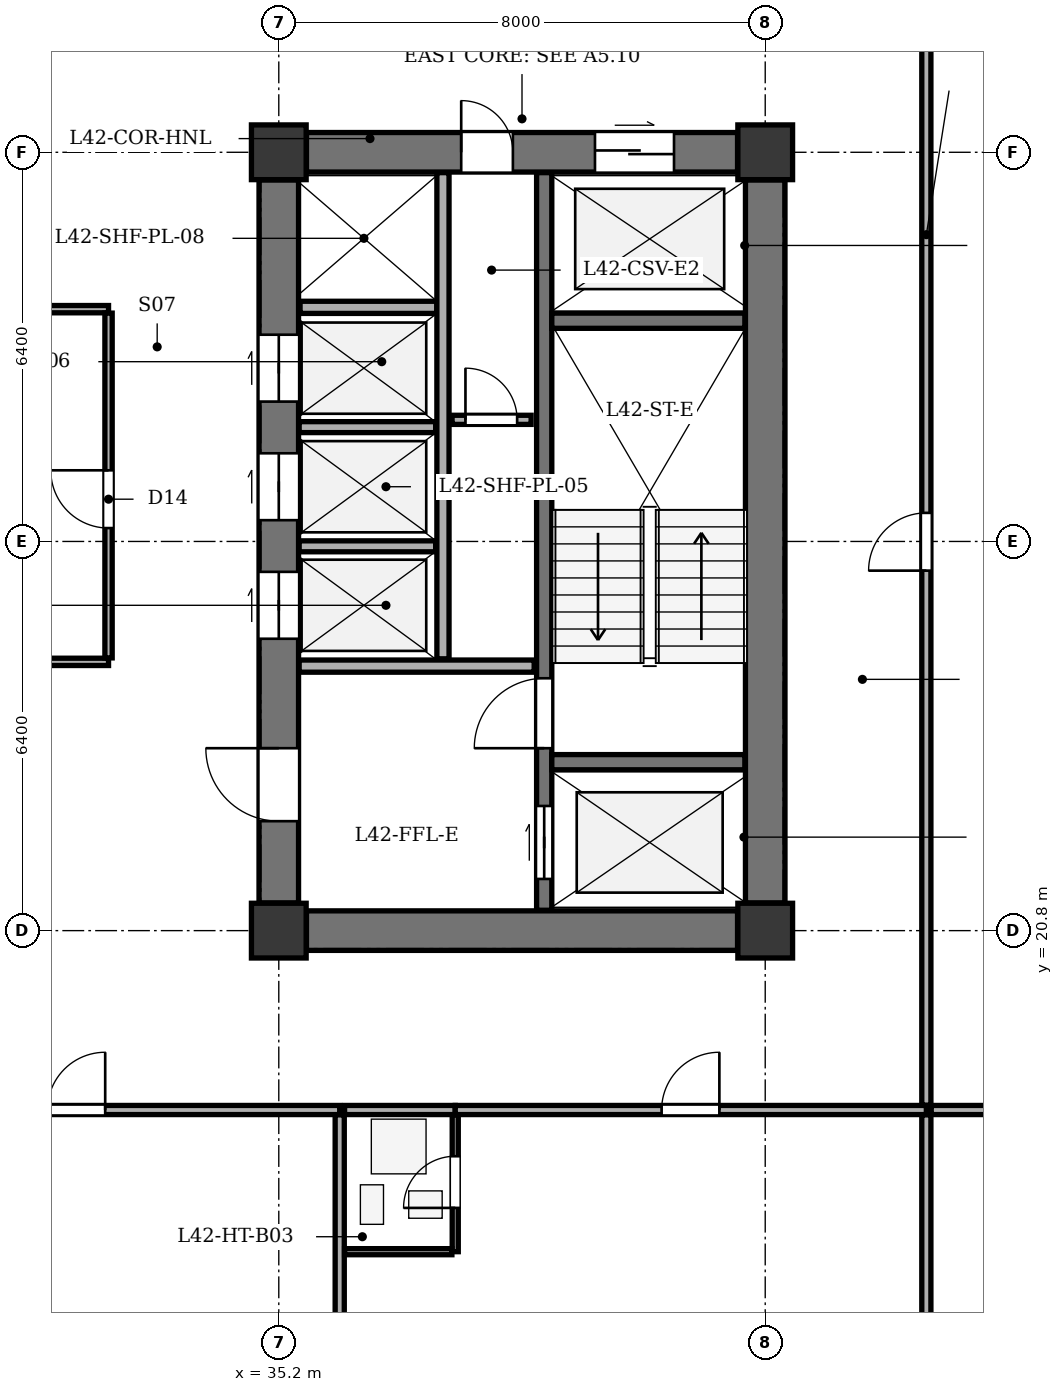
"""IFC4 building model, lengths in metres.
Left out: names, types, materials, properties, quantities, classifications, styles, units other than length and angle.
Written with IfcOpenShell. Run it as: python <this file> out.ifc"""

import sys

from ifc_helpers import new_model, si_unit, direction, frame, frame_2d, origin, origin_2d, place, context, subcontext, project, spatial, rectangle, extrude, element, fill, save


model = new_model("IFC4")
c1 = context("Model", 3, precision=1e-05, world=origin(), true_north=direction((0.0, 1.0)))
c2 = subcontext(c1, "Body", "Model", "MODEL_VIEW")
j1 = project(units=[si_unit("LENGTHUNIT", "METRE"), si_unit("PLANEANGLEUNIT", "RADIAN")], contexts=[c1])
p1 = place(None, origin())
s1 = spatial("IfcSite", under=j1, at=p1, CompositionType="ELEMENT")
p2 = place(p1, origin())
s2 = spatial("IfcBuilding", under=s1, at=p2, CompositionType="ELEMENT")
p3 = place(p2, frame((0.0, 0.0, 165.8)))
s3 = spatial("IfcBuildingStorey", under=s2, at=p3, CompositionType="ELEMENT", Elevation=165.8)
for number, where, z_axis, x_axis in (
    (1, (35.2, 20.8, 0.0), (0.0, 0.0, 1.0), (1.0, 0.0, 0.0)),
    (2, (43.2, 20.8, 0.0), (0.0, 0.0, 1.0), (1.0, 0.0, 0.0)),
    (3, (35.2, 33.6, 0.0), (0.0, 0.0, 1.0), (1.0, 0.0, 0.0)),
    (4, (43.2, 33.6, 0.0), (0.0, 0.0, 1.0), (1.0, 0.0, 0.0)),
):
    element("IfcColumn", number, at=place(p3, frame(where, z_axis=z_axis, x_axis=x_axis)), inside=s3, PredefinedType="COLUMN", context=c2, shape_type="SweptSolid", body=[
        extrude(rectangle(XDim=0.9, YDim=0.9, at=origin_2d()), origin(), (0.0, 0.0, 1.0), 3.5),
    ])
p4 = place(p3, frame((43.2, 21.255, 0.0), z_axis=(0.0, 0.0, 1.0), x_axis=(0.0, 1.0, 0.0)))
e5 = element("IfcWall", 5, at=p4, inside=s3, PredefinedType="SHEAR", context=c2, shape_type="SweptSolid", body=[
    extrude(rectangle(XDim=11.89, YDim=0.65, at=frame_2d((5.945, 0.0))), origin(), (0.0, 0.0, 1.0), 3.2),
])
p5 = place(p3, frame((35.655, 20.8, 0.0), z_axis=(0.0, 0.0, 1.0), x_axis=(1.0, 0.0, 0.0)))
e6 = element("IfcWall", 6, at=p5, inside=s3, PredefinedType="SHEAR", context=c2, shape_type="SweptSolid", body=[
    extrude(rectangle(XDim=7.09, YDim=0.65, at=frame_2d((3.545, 0.0))), origin(), (0.0, 0.0, 1.0), 3.2),
])
p6 = place(p3, frame((35.655, 33.6, 0.0), z_axis=(0.0, 0.0, 1.0), x_axis=(1.0, 0.0, 0.0)))
e7 = element("IfcWall", 7, at=p6, inside=s3, PredefinedType="SHEAR", context=c2, shape_type="SweptSolid", body=[
    extrude(rectangle(XDim=7.09, YDim=0.65, at=frame_2d((3.545, 0.0))), origin(), (0.0, 0.0, 1.0), 3.2),
])
p7 = place(p6, frame((4.745, 0.0, 0.0)))
e8 = element("IfcOpeningElement", 8, at=p7, cuts=e7, PredefinedType="OPENING", context=c2, shape_type="SweptSolid", body=[
    extrude(rectangle(XDim=1.3, YDim=2.15, at=frame_2d((0.65, 1.075))), frame((0.0, 0.335, 0.0), z_axis=(0.0, -1.0, 0.0), x_axis=(1.0, 0.0, 0.0)), (0.0, 0.0, 1.0), 0.67),
])
p8 = place(p6, frame((2.545, 0.0, 0.0)))
e9 = element("IfcOpeningElement", 9, at=p8, cuts=e7, PredefinedType="OPENING", context=c2, shape_type="SweptSolid", body=[
    extrude(rectangle(XDim=0.85, YDim=2.02, at=frame_2d((0.425, 1.01))), frame((0.0, 0.335, 0.0), z_axis=(0.0, -1.0, 0.0), x_axis=(1.0, 0.0, 0.0)), (0.0, 0.0, 1.0), 0.67),
])
p9 = place(p3, frame((35.2, 21.255, 0.0), z_axis=(0.0, 0.0, 1.0), x_axis=(0.0, 1.0, 0.0)))
e10 = element("IfcWall", 10, at=p9, inside=s3, PredefinedType="SHEAR", context=c2, shape_type="SweptSolid", body=[
    extrude(rectangle(XDim=11.89, YDim=0.65, at=frame_2d((5.945, 0.0))), origin(), (0.0, 0.0, 1.0), 3.2),
])
p10 = place(p9, frame((1.345, 0.0, 0.0)))
e11 = element("IfcOpeningElement", 11, at=p10, cuts=e10, PredefinedType="OPENING", context=c2, shape_type="SweptSolid", body=[
    extrude(rectangle(XDim=1.2, YDim=2.15, at=frame_2d((0.6, 1.075))), frame((0.0, 0.335, 0.0), z_axis=(0.0, -1.0, 0.0), x_axis=(1.0, 0.0, 0.0)), (0.0, 0.0, 1.0), 0.67),
])
p11 = place(p9, frame((4.345, 0.0, 0.0)))
e12 = element("IfcOpeningElement", 12, at=p11, cuts=e10, PredefinedType="OPENING", context=c2, shape_type="SweptSolid", body=[
    extrude(rectangle(XDim=1.1, YDim=2.1, at=frame_2d((0.55, 1.05))), frame((0.0, 0.335, 0.0), z_axis=(0.0, -1.0, 0.0), x_axis=(1.0, 0.0, 0.0)), (0.0, 0.0, 1.0), 0.67),
])
p12 = place(p9, frame((6.295, 0.0, 0.0)))
e13 = element("IfcOpeningElement", 13, at=p12, cuts=e10, PredefinedType="OPENING", context=c2, shape_type="SweptSolid", body=[
    extrude(rectangle(XDim=1.1, YDim=2.1, at=frame_2d((0.55, 1.05))), frame((0.0, 0.335, 0.0), z_axis=(0.0, -1.0, 0.0), x_axis=(1.0, 0.0, 0.0)), (0.0, 0.0, 1.0), 0.67),
])
p13 = place(p9, frame((8.245, 0.0, 0.0)))
e14 = element("IfcOpeningElement", 14, at=p13, cuts=e10, PredefinedType="OPENING", context=c2, shape_type="SweptSolid", body=[
    extrude(rectangle(XDim=1.1, YDim=2.1, at=frame_2d((0.55, 1.05))), frame((0.0, 0.335, 0.0), z_axis=(0.0, -1.0, 0.0), x_axis=(1.0, 0.0, 0.0)), (0.0, 0.0, 1.0), 0.67),
])
p14 = place(p3, frame((39.565, 21.135, 0.0), z_axis=(0.0, 0.0, 1.0), x_axis=(0.0, 1.0, 0.0)))
e15 = element("IfcWall", 15, at=p14, inside=s3, PredefinedType="SHEAR", context=c2, shape_type="SweptSolid", body=[
    extrude(rectangle(XDim=12.13, YDim=0.25, at=frame_2d((6.065, 0.0))), origin(), (0.0, 0.0, 1.0), 3.2),
])
p15 = place(p14, frame((0.515, 0.0, 0.0)))
e16 = element("IfcOpeningElement", 16, at=p15, cuts=e15, PredefinedType="OPENING", context=c2, shape_type="SweptSolid", body=[
    extrude(rectangle(XDim=1.2, YDim=2.15, at=frame_2d((0.6, 1.075))), frame((0.0, 0.135, 0.0), z_axis=(0.0, -1.0, 0.0), x_axis=(1.0, 0.0, 0.0)), (0.0, 0.0, 1.0), 0.27),
])
p16 = place(p14, frame((2.665, 0.0, 0.0)))
e17 = element("IfcOpeningElement", 17, at=p16, cuts=e15, PredefinedType="OPENING", context=c2, shape_type="SweptSolid", body=[
    extrude(rectangle(XDim=1.15, YDim=2.15, at=frame_2d((0.575, 1.075))), frame((0.0, 0.135, 0.0), z_axis=(0.0, -1.0, 0.0), x_axis=(1.0, 0.0, 0.0)), (0.0, 0.0, 1.0), 0.27),
])
for number, where, z_axis, x_axis in (
    (18, (39.69, 23.57, 0.0), (0.0, 0.0, 1.0), (1.0, 0.0, 0.0)),
    (19, (39.69, 30.83, 0.0), (0.0, 0.0, 1.0), (1.0, 0.0, 0.0)),
):
    element("IfcWall", number, at=place(p3, frame(where, z_axis=z_axis, x_axis=x_axis)), inside=s3, PredefinedType="SHEAR", context=c2, shape_type="SweptSolid", body=[
        extrude(rectangle(XDim=3.175, YDim=0.25, at=frame_2d((1.587, 0.0))), origin(), (0.0, 0.0, 1.0), 3.2),
    ])
p17 = place(p3, frame((35.535, 25.15, 0.0), z_axis=(0.0, 0.0, 1.0), x_axis=(1.0, 0.0, 0.0)))
e20 = element("IfcWall", 20, at=p17, inside=s3, PredefinedType="SOLIDWALL", context=c2, shape_type="SweptSolid", body=[
    extrude(rectangle(XDim=3.865, YDim=0.2, at=frame_2d((1.933, 0.0))), origin(), (0.0, 0.0, 1.0), 3.2),
])
p18 = place(p3, frame((35.55, 31.05, 0.0), z_axis=(0.0, 0.0, 1.0), x_axis=(1.0, 0.0, 0.0)))
e21 = element("IfcWall", 21, at=p18, inside=s3, PredefinedType="SOLIDWALL", context=c2, shape_type="SweptSolid", body=[
    extrude(rectangle(XDim=2.25, YDim=0.2, at=frame_2d((1.125, 0.0))), origin(), (0.0, 0.0, 1.0), 3.2),
])
p19 = place(p3, frame((37.9, 25.27, 0.0), z_axis=(0.0, 0.0, 1.0), x_axis=(0.0, 1.0, 0.0)))
e22 = element("IfcWall", 22, at=p19, inside=s3, PredefinedType="SOLIDWALL", context=c2, shape_type="SweptSolid", body=[
    extrude(rectangle(XDim=7.995, YDim=0.2, at=frame_2d((3.998, 0.0))), origin(), (0.0, 0.0, 1.0), 3.2),
])
for number, where, z_axis, x_axis in (
    (23, (35.535, 27.12, 0.0), (0.0, 0.0, 1.0), (1.0, 0.0, 0.0)),
    (24, (35.535, 29.08, 0.0), (0.0, 0.0, 1.0), (1.0, 0.0, 0.0)),
):
    element("IfcWall", number, at=place(p3, frame(where, z_axis=z_axis, x_axis=x_axis)), inside=s3, PredefinedType="PARTITIONING", context=c2, shape_type="SweptSolid", body=[
        extrude(rectangle(XDim=2.245, YDim=0.18, at=frame_2d((1.123, 0.0))), origin(), (0.0, 0.0, 1.0), 3.2),
    ])
p20 = place(p3, frame((38.05, 29.2, 0.0), z_axis=(0.0, 0.0, 1.0), x_axis=(1.0, 0.0, 0.0)))
e25 = element("IfcWall", 25, at=p20, inside=s3, PredefinedType="PARTITIONING", context=c2, shape_type="SweptSolid", body=[
    extrude(rectangle(XDim=1.3, YDim=0.15, at=frame_2d((0.65, 0.0))), origin(), (0.0, 0.0, 1.0), 3.2),
])
p21 = place(p20, frame((0.22, 0.0, 0.0)))
e26 = element("IfcOpeningElement", 26, at=p21, cuts=e25, PredefinedType="OPENING", context=c2, shape_type="SweptSolid", body=[
    extrude(rectangle(XDim=0.85, YDim=2.02, at=frame_2d((0.425, 1.01))), frame((0.0, 0.085, 0.0), z_axis=(0.0, -1.0, 0.0), x_axis=(1.0, 0.0, 0.0)), (0.0, 0.0, 1.0), 0.17),
])
p22 = place(p3, frame((20.46, 25.22, 0.0), z_axis=(0.0, 0.0, 1.0), x_axis=(1.0, 0.0, 0.0)))
e27 = element("IfcWall", 27, at=p22, inside=s3, PredefinedType="PARTITIONING", context=c2, shape_type="SweptSolid", body=[
    extrude(rectangle(XDim=11.94, YDim=0.12, at=frame_2d((5.97, 0.0))), origin(), (0.0, 0.0, 1.0), 3.2),
])
p23 = place(p22, frame((2.39, 0.0, 0.0)))
e28 = element("IfcOpeningElement", 28, at=p23, cuts=e27, PredefinedType="OPENING", context=c2, shape_type="SweptSolid", body=[
    extrude(rectangle(XDim=1.0, YDim=2.1, at=frame_2d((0.5, 1.05))), frame((0.0, 0.07, 0.0), z_axis=(0.0, -1.0, 0.0), x_axis=(1.0, 0.0, 0.0)), (0.0, 0.0, 1.0), 0.14),
])
p24 = place(p3, frame((20.46, 31.02, 0.0), z_axis=(0.0, 0.0, 1.0), x_axis=(1.0, 0.0, 0.0)))
e29 = element("IfcWall", 29, at=p24, inside=s3, PredefinedType="PARTITIONING", context=c2, shape_type="SweptSolid", body=[
    extrude(rectangle(XDim=11.94, YDim=0.12, at=frame_2d((5.97, 0.0))), origin(), (0.0, 0.0, 1.0), 3.2),
])
p25 = place(p3, frame((32.4, 25.285, 0.0), z_axis=(0.0, 0.0, 1.0), x_axis=(0.0, 1.0, 0.0)))
e30 = element("IfcWall", 30, at=p25, inside=s3, PredefinedType="PARTITIONING", context=c2, shape_type="SweptSolid", body=[
    extrude(rectangle(XDim=5.67, YDim=0.12, at=frame_2d((2.835, 0.0))), origin(), (0.0, 0.0, 1.0), 3.2),
])
p26 = place(p25, frame((2.135, 0.0, 0.0)))
e31 = element("IfcOpeningElement", 31, at=p26, cuts=e30, PredefinedType="OPENING", context=c2, shape_type="SweptSolid", body=[
    extrude(rectangle(XDim=0.95, YDim=2.1, at=frame_2d((0.475, 1.05))), frame((0.0, 0.07, 0.0), z_axis=(0.0, -1.0, 0.0), x_axis=(1.0, 0.0, 0.0)), (0.0, 0.0, 1.0), 0.14),
])
p27 = place(p3, frame((27.549, 17.85, 0.0), z_axis=(0.0, 0.0, 1.0), x_axis=(1.0, 0.0, 0.0)))
e32 = element("IfcWall", 32, at=p27, inside=s3, PredefinedType="PARTITIONING", context=c2, shape_type="SweptSolid", body=[
    extrude(rectangle(XDim=8.653, YDim=0.15, at=frame_2d((4.326, 0.0))), origin(), (0.0, 0.0, 1.0), 3.2),
])
p28 = place(p27, frame((3.846, 0.0, 0.0)))
e33 = element("IfcOpeningElement", 33, at=p28, cuts=e32, PredefinedType="OPENING", context=c2, shape_type="SweptSolid", body=[
    extrude(rectangle(XDim=0.95, YDim=2.1, at=frame_2d((0.475, 1.05))), frame((0.0, 0.085, 0.0), z_axis=(0.0, -1.0, 0.0), x_axis=(1.0, 0.0, 0.0)), (0.0, 0.0, 1.0), 0.17),
])
p29 = place(p3, frame((36.202, 8.275, 0.0), z_axis=(0.0, 0.0, 1.0), x_axis=(0.0, 1.0, 0.0)))
e34 = element("IfcWall", 34, at=p29, inside=s3, PredefinedType="PARTITIONING", context=c2, shape_type="SweptSolid", body=[
    extrude(rectangle(XDim=9.495, YDim=0.15, at=frame_2d((4.748, 0.0))), origin(), (0.0, 0.0, 1.0), 3.2),
])
p30 = place(p3, frame((36.282, 17.85, 0.0), z_axis=(0.0, 0.0, 1.0), x_axis=(1.0, 0.0, 0.0)))
e35 = element("IfcWall", 35, at=p30, inside=s3, PredefinedType="PARTITIONING", context=c2, shape_type="SweptSolid", body=[
    extrude(rectangle(XDim=1.82, YDim=0.15, at=frame_2d((0.91, 0.0))), origin(), (0.0, 0.0, 1.0), 3.2),
])
p31 = place(p3, frame((38.102, 17.85, 0.0), z_axis=(0.0, 0.0, 1.0), x_axis=(1.0, 0.0, 0.0)))
e36 = element("IfcWall", 36, at=p31, inside=s3, PredefinedType="PARTITIONING", context=c2, shape_type="SweptSolid", body=[
    extrude(rectangle(XDim=7.748, YDim=0.15, at=frame_2d((3.874, 0.0))), origin(), (0.0, 0.0, 1.0), 3.2),
])
p32 = place(p31, frame((3.394, 0.0, 0.0)))
e37 = element("IfcOpeningElement", 37, at=p32, cuts=e36, PredefinedType="OPENING", context=c2, shape_type="SweptSolid", body=[
    extrude(rectangle(XDim=0.95, YDim=2.1, at=frame_2d((0.475, 1.05))), frame((0.0, 0.085, 0.0), z_axis=(0.0, -1.0, 0.0), x_axis=(1.0, 0.0, 0.0)), (0.0, 0.0, 1.0), 0.17),
])
p33 = place(p3, frame((38.102, 15.52, 0.0), z_axis=(0.0, 0.0, 1.0), x_axis=(0.0, 1.0, 0.0)))
e38 = element("IfcWall", 38, at=p33, inside=s3, PredefinedType="PARTITIONING", context=c2, shape_type="SweptSolid", body=[
    extrude(rectangle(XDim=2.25, YDim=0.1, at=frame_2d((1.125, 0.0))), origin(), (0.0, 0.0, 1.0), 3.2),
])
p34 = place(p33, frame((0.72, 0.0, 0.0)))
e39 = element("IfcOpeningElement", 39, at=p34, cuts=e38, PredefinedType="OPENING", context=c2, shape_type="SweptSolid", body=[
    extrude(rectangle(XDim=0.85, YDim=2.05, at=frame_2d((0.425, 1.025))), frame((0.0, 0.06, 0.0), z_axis=(0.0, -1.0, 0.0), x_axis=(1.0, 0.0, 0.0)), (0.0, 0.0, 1.0), 0.12),
])
p35 = place(p3, frame((36.282, 15.52, 0.0), z_axis=(0.0, 0.0, 1.0), x_axis=(1.0, 0.0, 0.0)))
e40 = element("IfcWall", 40, at=p35, inside=s3, PredefinedType="PARTITIONING", context=c2, shape_type="SweptSolid", body=[
    extrude(rectangle(XDim=1.765, YDim=0.1, at=frame_2d((0.883, 0.0))), origin(), (0.0, 0.0, 1.0), 3.2),
])
p36 = place(p3, frame((45.85, 8.275, 0.0), z_axis=(0.0, 0.0, 1.0), x_axis=(0.0, 1.0, 0.0)))
e41 = element("IfcWall", 41, at=p36, inside=s3, PredefinedType="PARTITIONING", context=c2, shape_type="SweptSolid", body=[
    extrude(rectangle(XDim=9.495, YDim=0.15, at=frame_2d((4.748, 0.0))), origin(), (0.0, 0.0, 1.0), 3.2),
])
p37 = place(p3, frame((45.93, 17.85, 0.0), z_axis=(0.0, 0.0, 1.0), x_axis=(1.0, 0.0, 0.0)))
e42 = element("IfcWall", 42, at=p37, inside=s3, PredefinedType="PARTITIONING", context=c2, shape_type="SweptSolid", body=[
    extrude(rectangle(XDim=9.395, YDim=0.15, at=frame_2d((4.698, 0.0))), origin(), (0.0, 0.0, 1.0), 3.2),
])
p38 = place(p3, frame((45.85, 17.93, 0.0), z_axis=(0.0, 0.0, 1.0), x_axis=(0.0, 1.0, 0.0)))
e43 = element("IfcWall", 43, at=p38, inside=s3, PredefinedType="PARTITIONING", context=c2, shape_type="SweptSolid", body=[
    extrude(rectangle(XDim=18.54, YDim=0.15, at=frame_2d((9.27, 0.0))), origin(), (0.0, 0.0, 1.0), 3.2),
])
p39 = place(p38, frame((8.79, 0.0, 0.0)))
e44 = element("IfcOpeningElement", 44, at=p39, cuts=e43, PredefinedType="OPENING", context=c2, shape_type="SweptSolid", body=[
    extrude(rectangle(XDim=0.95, YDim=2.1, at=frame_2d((0.475, 1.05))), frame((0.0, 0.085, 0.0), z_axis=(0.0, -1.0, 0.0), x_axis=(1.0, 0.0, 0.0)), (0.0, 0.0, 1.0), 0.17),
])
p40 = place(p7, origin())
e45 = element("IfcDoor", 45, at=p40, inside=s3, OperationType="DOUBLE_DOOR_SLIDING", PredefinedType="DOOR", context=c2, shape_type="SweptSolid", body=[
    extrude(rectangle(XDim=1.3, YDim=2.15, at=frame_2d((0.65, 1.075))), frame((0.0, 0.025, 0.0), z_axis=(0.0, -1.0, 0.0), x_axis=(1.0, 0.0, 0.0)), (0.0, 0.0, 1.0), 0.05),
])
fill(e8, e45)
p41 = place(p8, origin())
e46 = element("IfcDoor", 46, at=p41, inside=s3, OperationType="SINGLE_SWING_LEFT", PredefinedType="DOOR", context=c2, shape_type="SweptSolid", body=[
    extrude(rectangle(XDim=0.85, YDim=2.02, at=frame_2d((0.425, 1.01))), frame((0.0, 0.025, 0.0), z_axis=(0.0, -1.0, 0.0), x_axis=(1.0, 0.0, 0.0)), (0.0, 0.0, 1.0), 0.05),
])
fill(e9, e46)
p42 = place(p10, origin())
e47 = element("IfcDoor", 47, at=p42, inside=s3, OperationType="SINGLE_SWING_RIGHT", PredefinedType="DOOR", context=c2, shape_type="SweptSolid", body=[
    extrude(rectangle(XDim=1.2, YDim=2.15, at=frame_2d((0.6, 1.075))), frame((0.0, 0.025, 0.0), z_axis=(0.0, -1.0, 0.0), x_axis=(1.0, 0.0, 0.0)), (0.0, 0.0, 1.0), 0.05),
])
fill(e11, e47)
p43 = place(p11, origin())
e48 = element("IfcDoor", 48, at=p43, inside=s3, OperationType="DOUBLE_DOOR_SLIDING", PredefinedType="DOOR", context=c2, shape_type="SweptSolid", body=[
    extrude(rectangle(XDim=1.1, YDim=2.1, at=frame_2d((0.55, 1.05))), frame((0.0, 0.025, 0.0), z_axis=(0.0, -1.0, 0.0), x_axis=(1.0, 0.0, 0.0)), (0.0, 0.0, 1.0), 0.05),
])
fill(e12, e48)
p44 = place(p12, origin())
e49 = element("IfcDoor", 49, at=p44, inside=s3, OperationType="DOUBLE_DOOR_SLIDING", PredefinedType="DOOR", context=c2, shape_type="SweptSolid", body=[
    extrude(rectangle(XDim=1.1, YDim=2.1, at=frame_2d((0.55, 1.05))), frame((0.0, 0.025, 0.0), z_axis=(0.0, -1.0, 0.0), x_axis=(1.0, 0.0, 0.0)), (0.0, 0.0, 1.0), 0.05),
])
fill(e13, e49)
p45 = place(p13, origin())
e50 = element("IfcDoor", 50, at=p45, inside=s3, OperationType="DOUBLE_DOOR_SLIDING", PredefinedType="DOOR", context=c2, shape_type="SweptSolid", body=[
    extrude(rectangle(XDim=1.1, YDim=2.1, at=frame_2d((0.55, 1.05))), frame((0.0, 0.025, 0.0), z_axis=(0.0, -1.0, 0.0), x_axis=(1.0, 0.0, 0.0)), (0.0, 0.0, 1.0), 0.05),
])
fill(e14, e50)
p46 = place(p15, origin())
e51 = element("IfcDoor", 51, at=p46, inside=s3, OperationType="DOUBLE_DOOR_SLIDING", PredefinedType="DOOR", context=c2, shape_type="SweptSolid", body=[
    extrude(rectangle(XDim=1.2, YDim=2.15, at=frame_2d((0.6, 1.075))), frame((0.0, 0.025, 0.0), z_axis=(0.0, -1.0, 0.0), x_axis=(1.0, 0.0, 0.0)), (0.0, 0.0, 1.0), 0.05),
])
fill(e16, e51)
p47 = place(p16, origin())
e52 = element("IfcDoor", 52, at=p47, inside=s3, OperationType="SINGLE_SWING_LEFT", PredefinedType="DOOR", context=c2, shape_type="SweptSolid", body=[
    extrude(rectangle(XDim=1.15, YDim=2.15, at=frame_2d((0.575, 1.075))), frame((0.0, 0.025, 0.0), z_axis=(0.0, -1.0, 0.0), x_axis=(1.0, 0.0, 0.0)), (0.0, 0.0, 1.0), 0.05),
])
fill(e17, e52)
p48 = place(p21, origin())
e53 = element("IfcDoor", 53, at=p48, inside=s3, OperationType="SINGLE_SWING_LEFT", PredefinedType="DOOR", context=c2, shape_type="SweptSolid", body=[
    extrude(rectangle(XDim=0.85, YDim=2.02, at=frame_2d((0.425, 1.01))), frame((0.0, 0.025, 0.0), z_axis=(0.0, -1.0, 0.0), x_axis=(1.0, 0.0, 0.0)), (0.0, 0.0, 1.0), 0.05),
])
fill(e26, e53)
p49 = place(p26, origin())
e54 = element("IfcDoor", 54, at=p49, inside=s3, OperationType="SINGLE_SWING_RIGHT", PredefinedType="DOOR", context=c2, shape_type="SweptSolid", body=[
    extrude(rectangle(XDim=0.95, YDim=2.1, at=frame_2d((0.475, 1.05))), frame((0.0, 0.025, 0.0), z_axis=(0.0, -1.0, 0.0), x_axis=(1.0, 0.0, 0.0)), (0.0, 0.0, 1.0), 0.05),
])
fill(e31, e54)
p50 = place(p28, origin())
e55 = element("IfcDoor", 55, at=p50, inside=s3, OperationType="SINGLE_SWING_RIGHT", PredefinedType="DOOR", context=c2, shape_type="SweptSolid", body=[
    extrude(rectangle(XDim=0.95, YDim=2.1, at=frame_2d((0.475, 1.05))), frame((0.0, 0.025, 0.0), z_axis=(0.0, -1.0, 0.0), x_axis=(1.0, 0.0, 0.0)), (0.0, 0.0, 1.0), 0.05),
])
fill(e33, e55)
p51 = place(p34, origin())
e56 = element("IfcDoor", 56, at=p51, inside=s3, OperationType="SINGLE_SWING_LEFT", PredefinedType="DOOR", context=c2, shape_type="SweptSolid", body=[
    extrude(rectangle(XDim=0.85, YDim=2.05, at=frame_2d((0.425, 1.025))), frame((0.0, 0.025, 0.0), z_axis=(0.0, -1.0, 0.0), x_axis=(1.0, 0.0, 0.0)), (0.0, 0.0, 1.0), 0.05),
])
fill(e39, e56)
p52 = place(p32, origin())
e57 = element("IfcDoor", 57, at=p52, inside=s3, OperationType="SINGLE_SWING_RIGHT", PredefinedType="DOOR", context=c2, shape_type="SweptSolid", body=[
    extrude(rectangle(XDim=0.95, YDim=2.1, at=frame_2d((0.475, 1.05))), frame((0.0, 0.025, 0.0), z_axis=(0.0, -1.0, 0.0), x_axis=(1.0, 0.0, 0.0)), (0.0, 0.0, 1.0), 0.05),
])
fill(e37, e57)
p53 = place(p39, origin())
e58 = element("IfcDoor", 58, at=p53, inside=s3, OperationType="SINGLE_SWING_LEFT", PredefinedType="DOOR", context=c2, shape_type="SweptSolid", body=[
    extrude(rectangle(XDim=0.95, YDim=2.1, at=frame_2d((0.475, 1.05))), frame((0.0, 0.025, 0.0), z_axis=(0.0, -1.0, 0.0), x_axis=(1.0, 0.0, 0.0)), (0.0, 0.0, 1.0), 0.05),
])
fill(e44, e58)
save(model, sys.argv[1])
